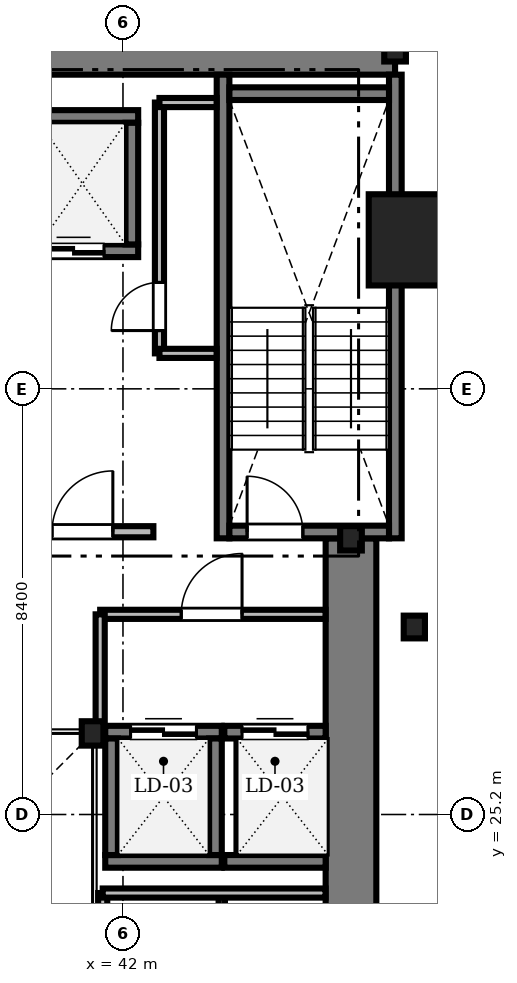
"""IFC4 building model, lengths in metres.
Left out: names, types, materials, properties, quantities, classifications, styles, units other than length and angle.
Written with IfcOpenShell. Run it as: python <this file> out.ifc"""

import sys

from ifc_helpers import new_model, si_unit, direction, frame, frame_2d, origin, origin_2d, place, context, subcontext, project, spatial, rectangle, i_section, extrude, source, transform, mapped, element, fill, save


model = new_model("IFC4")
c1 = context("Model", 3, precision=1e-05, world=origin(), true_north=direction((0.0, 1.0)))
c2 = subcontext(c1, "Body", "Model", "MODEL_VIEW")
j1 = project(units=[si_unit("LENGTHUNIT", "METRE"), si_unit("PLANEANGLEUNIT", "RADIAN")], contexts=[c1])
p1 = place(None, origin())
s1 = spatial("IfcSite", under=j1, at=p1, CompositionType="ELEMENT")
p2 = place(p1, origin())
s2 = spatial("IfcBuilding", under=s1, at=p2, CompositionType="ELEMENT")
p3 = place(p2, frame((0.0, 0.0, 53.15)))
s3 = spatial("IfcBuildingStorey", under=s2, at=p3, CompositionType="ELEMENT", Elevation=53.15)
m1 = source(origin(), c2, "Body", "SweptSolid", [
    extrude(rectangle(XDim=17.52, YDim=1.0, at=frame_2d((8.76, 0.0))), origin(), (0.0, 0.0, 1.0), 3.41),
])
p4 = place(p3, frame((29.85, 40.3, 0.0), z_axis=(0.0, 0.0, 1.0), x_axis=(1.0, 0.0, 0.0)))
e1 = element("IfcWall", 1, at=p4, inside=s3, PredefinedType="SHEAR", context=c2, shape_type="MappedRepresentation", body=[
    mapped(m1, transform((0.0, 0.0, 0.0), scale=1.0)),
])
m2 = source(origin(), c2, "Body", "SweptSolid", [
    extrude(rectangle(XDim=13.15, YDim=1.0, at=frame_2d((6.575, 0.0))), origin(), (0.0, 0.0, 1.0), 3.41),
])
p5 = place(p3, frame((46.5, 17.5, 0.0), z_axis=(0.0, 0.0, 1.0), x_axis=(0.0, 1.0, 0.0)))
e2 = element("IfcWall", 2, at=p5, inside=s3, PredefinedType="SHEAR", context=c2, shape_type="MappedRepresentation", body=[
    mapped(m2, transform((0.0, 0.0, 0.0), scale=1.0)),
])
m3 = source(origin(), c2, "Body", "SweptSolid", [
    extrude(i_section(OverallWidth=0.428, OverallDepth=0.481, WebThickness=0.04, FlangeThickness=0.063, FilletRadius=0.015, at=origin_2d()), origin(), (0.0, 0.0, 1.0), 3.41),
])
for number, where, z_axis, x_axis in (
    (3, (41.4, 26.8, 0.0), (0.0, 0.0, 1.0), (1.0, 0.0, 0.0)),
    (4, (46.5, 30.65, 0.0), (0.0, 0.0, 1.0), (1.0, 0.0, 0.0)),
    (5, (47.37, 40.3, 0.0), (0.0, 0.0, 1.0), (1.0, 0.0, 0.0)),
):
    element("IfcColumn", number, at=place(p3, frame(where, z_axis=z_axis, x_axis=x_axis)), inside=s3, PredefinedType="COLUMN", context=c2, shape_type="MappedRepresentation", body=[
        mapped(m3, transform((0.0, 0.0, 0.0), scale=1.0)),
    ])
m4 = source(origin(), c2, "Body", "SweptSolid", [
    extrude(rectangle(XDim=1.8, YDim=1.8, at=origin_2d()), origin(), (0.0, 0.0, 1.0), 3.41),
])
p6 = place(p3, frame((47.75, 36.54, 0.0), z_axis=(0.0, 0.0, 1.0), x_axis=(1.0, 0.0, 0.0)))
e6 = element("IfcColumn", 6, at=p6, inside=s3, PredefinedType="COLUMN", context=c2, shape_type="MappedRepresentation", body=[
    mapped(m4, transform((0.0, 0.0, 0.0), scale=1.0)),
])
m5 = source(origin(), c2, "Body", "SweptSolid", [
    extrude(i_section(OverallWidth=0.419, OverallDepth=0.449, WebThickness=0.031, FlangeThickness=0.048, FilletRadius=0.015, at=origin_2d()), origin(), (0.0, 0.0, 1.0), 3.41),
])
p7 = place(p3, frame((47.75, 28.9, 0.0), z_axis=(0.0, 0.0, 1.0), x_axis=(1.0, 0.0, 0.0)))
e7 = element("IfcColumn", 7, at=p7, inside=s3, PredefinedType="COLUMN", context=c2, shape_type="MappedRepresentation", body=[
    mapped(m5, transform((0.0, 0.0, 0.0), scale=1.0)),
])
m6 = source(origin(), c2, "Body", "SweptSolid", [
    extrude(rectangle(XDim=9.15, YDim=0.25, at=frame_2d((4.575, 0.0))), origin(), (0.0, 0.0, 1.0), 3.45),
])
for number, where, z_axis, x_axis in (
    (8, (43.975, 30.65, 0.0), (0.0, 0.0, 1.0), (0.0, 1.0, 0.0)),
    (9, (47.375, 30.65, 0.0), (0.0, 0.0, 1.0), (0.0, 1.0, 0.0)),
):
    element("IfcWall", number, at=place(p3, frame(where, z_axis=z_axis, x_axis=x_axis)), inside=s3, PredefinedType="SOLIDWALL", context=c2, shape_type="MappedRepresentation", body=[
        mapped(m6, transform((0.0, 0.0, 0.0), scale=1.0)),
    ])
m7 = source(origin(), c2, "Body", "SweptSolid", [
    extrude(rectangle(XDim=3.15, YDim=0.25, at=frame_2d((1.575, 0.0))), origin(), (0.0, 0.0, 1.0), 3.45),
])
p8 = place(p3, frame((44.1, 39.425, 0.0), z_axis=(0.0, 0.0, 1.0), x_axis=(1.0, 0.0, 0.0)))
e10 = element("IfcWall", 10, at=p8, inside=s3, PredefinedType="SOLIDWALL", context=c2, shape_type="MappedRepresentation", body=[
    mapped(m7, transform((0.0, 0.0, 0.0), scale=1.0)),
])
p9 = place(p3, frame((44.1, 30.775, 0.0), z_axis=(0.0, 0.0, 1.0), x_axis=(1.0, 0.0, 0.0)))
e11 = element("IfcWall", 11, at=p9, inside=s3, PredefinedType="SOLIDWALL", context=c2, shape_type="MappedRepresentation", body=[
    mapped(m7, transform((0.0, 0.0, 0.0), scale=1.0)),
])
m8 = source(origin(), c2, "Body", "SweptSolid", [
    extrude(rectangle(XDim=1.1, YDim=2.2, at=frame_2d((0.55, 1.1))), frame((0.0, 0.135, 0.0), z_axis=(0.0, -1.0, 0.0), x_axis=(1.0, 0.0, 0.0)), (0.0, 0.0, 1.0), 0.27),
])
p10 = place(p9, frame((0.35, 0.0, 0.0)))
e12 = element("IfcOpeningElement", 12, at=p10, cuts=e11, PredefinedType="OPENING", context=c2, shape_type="MappedRepresentation", body=[
    mapped(m8, transform((0.0, 0.0, 0.0), scale=1.0)),
])
m9 = source(origin(), c2, "Body", "SweptSolid", [
    extrude(rectangle(XDim=2.8, YDim=0.22, at=frame_2d((1.4, 0.0))), origin(), (0.0, 0.0, 1.0), 3.41),
])
p11 = place(p3, frame((39.8, 30.78, 0.0), z_axis=(0.0, 0.0, 1.0), x_axis=(1.0, 0.0, 0.0)))
e13 = element("IfcWall", 13, at=p11, inside=s3, PredefinedType="SOLIDWALL", context=c2, shape_type="MappedRepresentation", body=[
    mapped(m9, transform((0.0, 0.0, 0.0), scale=1.0)),
])
m10 = source(origin(), c2, "Body", "SweptSolid", [
    extrude(rectangle(XDim=1.2, YDim=2.2, at=frame_2d((0.6, 1.1))), frame((0.0, 0.12, 0.0), z_axis=(0.0, -1.0, 0.0), x_axis=(1.0, 0.0, 0.0)), (0.0, 0.0, 1.0), 0.24),
])
p12 = place(p11, frame((0.8, 0.0, 0.0)))
e14 = element("IfcOpeningElement", 14, at=p12, cuts=e13, PredefinedType="OPENING", context=c2, shape_type="MappedRepresentation", body=[
    mapped(m10, transform((0.0, 0.0, 0.0), scale=1.0)),
])
m11 = source(origin(), c2, "Body", "SweptSolid", [
    extrude(rectangle(XDim=2.55, YDim=0.25, at=frame_2d((1.275, 0.0))), origin(), (0.0, 0.0, 1.0), 3.41),
])
p13 = place(p3, frame((39.75, 36.325, 0.0), z_axis=(0.0, 0.0, 1.0), x_axis=(1.0, 0.0, 0.0)))
e15 = element("IfcWall", 15, at=p13, inside=s3, PredefinedType="SOLIDWALL", context=c2, shape_type="MappedRepresentation", body=[
    mapped(m11, transform((0.0, 0.0, 0.0), scale=1.0)),
])
m12 = source(origin(), c2, "Body", "SweptSolid", [
    extrude(rectangle(XDim=1.2, YDim=2.25, at=frame_2d((0.6, 1.125))), frame((0.0, 0.135, 0.0), z_axis=(0.0, -1.0, 0.0), x_axis=(1.0, 0.0, 0.0)), (0.0, 0.0, 1.0), 0.27),
])
p14 = place(p13, frame((0.675, 0.0, 0.0)))
e16 = element("IfcOpeningElement", 16, at=p14, cuts=e15, PredefinedType="OPENING", context=c2, shape_type="MappedRepresentation", body=[
    mapped(m12, transform((0.0, 0.0, 0.0), scale=1.0)),
])
p15 = place(p3, frame((39.75, 38.975, 0.0), z_axis=(0.0, 0.0, 1.0), x_axis=(1.0, 0.0, 0.0)))
e17 = element("IfcWall", 17, at=p15, inside=s3, PredefinedType="SOLIDWALL", context=c2, shape_type="MappedRepresentation", body=[
    mapped(m11, transform((0.0, 0.0, 0.0), scale=1.0)),
])
m13 = source(origin(), c2, "Body", "SweptSolid", [
    extrude(rectangle(XDim=2.4, YDim=0.25, at=frame_2d((1.2, 0.0))), origin(), (0.0, 0.0, 1.0), 3.41),
])
p16 = place(p3, frame((42.175, 36.45, 0.0), z_axis=(0.0, 0.0, 1.0), x_axis=(0.0, 1.0, 0.0)))
e18 = element("IfcWall", 18, at=p16, inside=s3, PredefinedType="SOLIDWALL", context=c2, shape_type="MappedRepresentation", body=[
    mapped(m13, transform((0.0, 0.0, 0.0), scale=1.0)),
])
m14 = source(origin(), c2, "Body", "SweptSolid", [
    extrude(rectangle(XDim=2.3, YDim=0.25, at=frame_2d((1.15, 0.0))), origin(), (0.0, 0.0, 1.0), 3.41),
])
p17 = place(p3, frame((41.65, 24.275, 0.0), z_axis=(0.0, 0.0, 1.0), x_axis=(1.0, 0.0, 0.0)))
e19 = element("IfcWall", 19, at=p17, inside=s3, PredefinedType="SOLIDWALL", context=c2, shape_type="MappedRepresentation", body=[
    mapped(m14, transform((0.0, 0.0, 0.0), scale=1.0)),
])
p18 = place(p3, frame((41.65, 26.825, 0.0), z_axis=(0.0, 0.0, 1.0), x_axis=(1.0, 0.0, 0.0)))
e20 = element("IfcWall", 20, at=p18, inside=s3, PredefinedType="SOLIDWALL", context=c2, shape_type="MappedRepresentation", body=[
    mapped(m14, transform((0.0, 0.0, 0.0), scale=1.0)),
])
m15 = source(origin(), c2, "Body", "SweptSolid", [
    extrude(rectangle(XDim=1.3, YDim=2.3, at=frame_2d((0.65, 1.15))), frame((0.0, 0.135, 0.0), z_axis=(0.0, -1.0, 0.0), x_axis=(1.0, 0.0, 0.0)), (0.0, 0.0, 1.0), 0.27),
])
p19 = place(p18, frame((0.5, 0.0, 0.0)))
e21 = element("IfcOpeningElement", 21, at=p19, cuts=e20, PredefinedType="OPENING", context=c2, shape_type="MappedRepresentation", body=[
    mapped(m15, transform((0.0, 0.0, 0.0), scale=1.0)),
])
for number, where, z_axis, x_axis in (
    (22, (41.775, 24.4, 0.0), (0.0, 0.0, 1.0), (0.0, 1.0, 0.0)),
    (23, (43.825, 24.4, 0.0), (0.0, 0.0, 1.0), (0.0, 1.0, 0.0)),
):
    element("IfcWall", number, at=place(p3, frame(where, z_axis=z_axis, x_axis=x_axis)), inside=s3, PredefinedType="SOLIDWALL", context=c2, shape_type="MappedRepresentation", body=[
        mapped(m14, transform((0.0, 0.0, 0.0), scale=1.0)),
    ])
m16 = source(origin(), c2, "Body", "SweptSolid", [
    extrude(rectangle(XDim=2.0, YDim=0.25, at=frame_2d((1.0, 0.0))), origin(), (0.0, 0.0, 1.0), 3.41),
])
p20 = place(p3, frame((44.0, 24.275, 0.0), z_axis=(0.0, 0.0, 1.0), x_axis=(1.0, 0.0, 0.0)))
e24 = element("IfcWall", 24, at=p20, inside=s3, PredefinedType="SOLIDWALL", context=c2, shape_type="MappedRepresentation", body=[
    mapped(m16, transform((0.0, 0.0, 0.0), scale=1.0)),
])
p21 = place(p3, frame((44.0, 26.825, 0.0), z_axis=(0.0, 0.0, 1.0), x_axis=(1.0, 0.0, 0.0)))
e25 = element("IfcWall", 25, at=p21, inside=s3, PredefinedType="SOLIDWALL", context=c2, shape_type="MappedRepresentation", body=[
    mapped(m16, transform((0.0, 0.0, 0.0), scale=1.0)),
])
p22 = place(p21, frame((0.35, 0.0, 0.0)))
e26 = element("IfcOpeningElement", 26, at=p22, cuts=e25, PredefinedType="OPENING", context=c2, shape_type="MappedRepresentation", body=[
    mapped(m15, transform((0.0, 0.0, 0.0), scale=1.0)),
])
m17 = source(origin(), c2, "Body", "SweptSolid", [
    extrude(rectangle(XDim=4.95, YDim=0.18, at=frame_2d((2.475, 0.0))), origin(), (0.0, 0.0, 1.0), 3.41),
])
p23 = place(p3, frame((42.72, 34.3, 0.0), z_axis=(0.0, 0.0, 1.0), x_axis=(0.0, 1.0, 0.0)))
e27 = element("IfcWall", 27, at=p23, inside=s3, PredefinedType="PARTITIONING", context=c2, shape_type="MappedRepresentation", body=[
    mapped(m17, transform((0.0, 0.0, 0.0), scale=1.0)),
])
m18 = source(origin(), c2, "Body", "SweptSolid", [
    extrude(rectangle(XDim=0.95, YDim=2.15, at=frame_2d((0.475, 1.075))), frame((0.0, 0.1, 0.0), z_axis=(0.0, -1.0, 0.0), x_axis=(1.0, 0.0, 0.0)), (0.0, 0.0, 1.0), 0.2),
])
p24 = place(p23, frame((0.45, 0.0, 0.0)))
e28 = element("IfcOpeningElement", 28, at=p24, cuts=e27, PredefinedType="OPENING", context=c2, shape_type="MappedRepresentation", body=[
    mapped(m18, transform((0.0, 0.0, 0.0), scale=1.0)),
])
m19 = source(origin(), c2, "Body", "SweptSolid", [
    extrude(rectangle(XDim=4.448, YDim=0.18, at=frame_2d((2.224, 0.0))), origin(), (0.0, 0.0, 1.0), 3.042),
])
p25 = place(p3, frame((41.55, 29.15, 0.0), z_axis=(0.0, 0.0, 1.0), x_axis=(1.0, 0.0, 0.0)))
e29 = element("IfcWall", 29, at=p25, inside=s3, PredefinedType="PARTITIONING", context=c2, shape_type="MappedRepresentation", body=[
    mapped(m19, transform((0.0, 0.0, 0.0), scale=1.0)),
])
m20 = source(origin(), c2, "Body", "SweptSolid", [
    extrude(rectangle(XDim=1.2, YDim=2.2, at=frame_2d((0.6, 1.1))), frame((0.0, 0.1, 0.0), z_axis=(0.0, -1.0, 0.0), x_axis=(1.0, 0.0, 0.0)), (0.0, 0.0, 1.0), 0.2),
])
p26 = place(p25, frame((1.6, 0.0, 0.0)))
e30 = element("IfcOpeningElement", 30, at=p26, cuts=e29, PredefinedType="OPENING", context=c2, shape_type="MappedRepresentation", body=[
    mapped(m20, transform((0.0, 0.0, 0.0), scale=1.0)),
])
m21 = source(origin(), c2, "Body", "SweptSolid", [
    extrude(rectangle(XDim=7.15, YDim=0.18, at=frame_2d((3.575, 0.0))), origin(), (0.0, 0.0, 1.0), 2.802),
])
p27 = place(p3, frame((41.6, 16.5, 0.0), z_axis=(0.0, 0.0, 1.0), x_axis=(0.0, 1.0, 0.0)))
e31 = element("IfcWall", 31, at=p27, inside=s3, PredefinedType="PARTITIONING", context=c2, shape_type="MappedRepresentation", body=[
    mapped(m21, transform((0.0, 0.0, 0.0), scale=1.0)),
])
m22 = source(origin(), c2, "Body", "SweptSolid", [
    extrude(rectangle(XDim=7.15, YDim=0.125, at=frame_2d((3.575, 0.0))), origin(), (0.0, 0.0, 1.0), 2.802),
])
p28 = place(p3, frame((43.95, 16.5, 0.0), z_axis=(0.0, 0.0, 1.0), x_axis=(0.0, 1.0, 0.0)))
e32 = element("IfcWall", 32, at=p28, inside=s3, PredefinedType="PARTITIONING", context=c2, shape_type="MappedRepresentation", body=[
    mapped(m22, transform((0.0, 0.0, 0.0), scale=1.0)),
])
m23 = source(origin(), c2, "Body", "SweptSolid", [
    extrude(rectangle(XDim=4.398, YDim=0.18, at=frame_2d((2.199, 0.0))), origin(), (0.0, 0.0, 1.0), 3.41),
])
p29 = place(p3, frame((41.6, 23.65, 0.0), z_axis=(0.0, 0.0, 1.0), x_axis=(1.0, 0.0, 0.0)))
e33 = element("IfcWall", 33, at=p29, inside=s3, PredefinedType="PARTITIONING", context=c2, shape_type="MappedRepresentation", body=[
    mapped(m23, transform((0.0, 0.0, 0.0), scale=1.0)),
])
m24 = source(origin(), c2, "Body", "SweptSolid", [
    extrude(rectangle(XDim=2.35, YDim=0.18, at=frame_2d((1.175, 0.0))), origin(), (0.0, 0.0, 1.0), 2.802),
])
p30 = place(p3, frame((41.55, 26.8, 0.0), z_axis=(0.0, 0.0, 1.0), x_axis=(0.0, 1.0, 0.0)))
e34 = element("IfcWall", 34, at=p30, inside=s3, PredefinedType="PARTITIONING", context=c2, shape_type="MappedRepresentation", body=[
    mapped(m24, transform((0.0, 0.0, 0.0), scale=1.0)),
])
m25 = source(origin(), c2, "Body", "SweptSolid", [
    extrude(rectangle(XDim=1.128, YDim=0.18, at=frame_2d((0.564, 0.0))), origin(), (0.0, 0.0, 1.0), 3.41),
])
for number, where, z_axis, x_axis in (
    (35, (42.72, 34.3, 0.0), (0.0, 0.0, 1.0), (1.0, 0.0, 0.0)),
    (36, (42.72, 39.25, 0.0), (0.0, 0.0, 1.0), (1.0, 0.0, 0.0)),
):
    element("IfcWall", number, at=place(p3, frame(where, z_axis=z_axis, x_axis=x_axis)), inside=s3, PredefinedType="PARTITIONING", context=c2, shape_type="MappedRepresentation", body=[
        mapped(m25, transform((0.0, 0.0, 0.0), scale=1.0)),
    ])
m26 = source(origin(), c2, "Body", "SweptSolid", [
    extrude(rectangle(XDim=1.1, YDim=2.2, at=frame_2d((0.55, 1.1))), frame((0.0, 0.025, 0.0), z_axis=(0.0, -1.0, 0.0), x_axis=(1.0, 0.0, 0.0)), (0.0, 0.0, 1.0), 0.05),
])
p31 = place(p10, origin())
e37 = element("IfcDoor", 37, at=p31, inside=s3, OperationType="SINGLE_SWING_LEFT", PredefinedType="DOOR", context=c2, shape_type="MappedRepresentation", body=[
    mapped(m26, transform((0.0, 0.0, 0.0), scale=1.0)),
])
fill(e12, e37)
m27 = source(origin(), c2, "Body", "SweptSolid", [
    extrude(rectangle(XDim=1.2, YDim=2.2, at=frame_2d((0.6, 1.1))), frame((0.0, 0.025, 0.0), z_axis=(0.0, -1.0, 0.0), x_axis=(1.0, 0.0, 0.0)), (0.0, 0.0, 1.0), 0.05),
])
p32 = place(p12, origin())
e38 = element("IfcDoor", 38, at=p32, inside=s3, OperationType="SINGLE_SWING_RIGHT", PredefinedType="DOOR", context=c2, shape_type="MappedRepresentation", body=[
    mapped(m27, transform((0.0, 0.0, 0.0), scale=1.0)),
])
fill(e14, e38)
m28 = source(origin(), c2, "Body", "SweptSolid", [
    extrude(rectangle(XDim=1.2, YDim=2.25, at=frame_2d((0.6, 1.125))), frame((0.0, 0.025, 0.0), z_axis=(0.0, -1.0, 0.0), x_axis=(1.0, 0.0, 0.0)), (0.0, 0.0, 1.0), 0.05),
])
p33 = place(p14, origin())
e39 = element("IfcDoor", 39, at=p33, inside=s3, OperationType="DOUBLE_DOOR_SLIDING", PredefinedType="DOOR", context=c2, shape_type="MappedRepresentation", body=[
    mapped(m28, transform((0.0, 0.0, 0.0), scale=1.0)),
])
fill(e16, e39)
m29 = source(origin(), c2, "Body", "SweptSolid", [
    extrude(rectangle(XDim=1.3, YDim=2.3, at=frame_2d((0.65, 1.15))), frame((0.0, 0.025, 0.0), z_axis=(0.0, -1.0, 0.0), x_axis=(1.0, 0.0, 0.0)), (0.0, 0.0, 1.0), 0.05),
])
p34 = place(p19, origin())
e40 = element("IfcDoor", 40, at=p34, inside=s3, OperationType="DOUBLE_DOOR_SLIDING", PredefinedType="DOOR", context=c2, shape_type="MappedRepresentation", body=[
    mapped(m29, transform((0.0, 0.0, 0.0), scale=1.0)),
])
fill(e21, e40)
p35 = place(p22, origin())
e41 = element("IfcDoor", 41, at=p35, inside=s3, OperationType="DOUBLE_DOOR_SLIDING", PredefinedType="DOOR", context=c2, shape_type="MappedRepresentation", body=[
    mapped(m29, transform((0.0, 0.0, 0.0), scale=1.0)),
])
fill(e26, e41)
m30 = source(origin(), c2, "Body", "SweptSolid", [
    extrude(rectangle(XDim=0.95, YDim=2.15, at=frame_2d((0.475, 1.075))), frame((0.0, 0.025, 0.0), z_axis=(0.0, -1.0, 0.0), x_axis=(1.0, 0.0, 0.0)), (0.0, 0.0, 1.0), 0.05),
])
p36 = place(p24, origin())
e42 = element("IfcDoor", 42, at=p36, inside=s3, OperationType="SINGLE_SWING_LEFT", PredefinedType="DOOR", context=c2, shape_type="MappedRepresentation", body=[
    mapped(m30, transform((0.0, 0.0, 0.0), scale=1.0)),
])
fill(e28, e42)
p37 = place(p26, origin())
e43 = element("IfcDoor", 43, at=p37, inside=s3, OperationType="SINGLE_SWING_RIGHT", PredefinedType="DOOR", context=c2, shape_type="MappedRepresentation", body=[
    mapped(m27, transform((0.0, 0.0, 0.0), scale=1.0)),
])
fill(e30, e43)
save(model, sys.argv[1])
